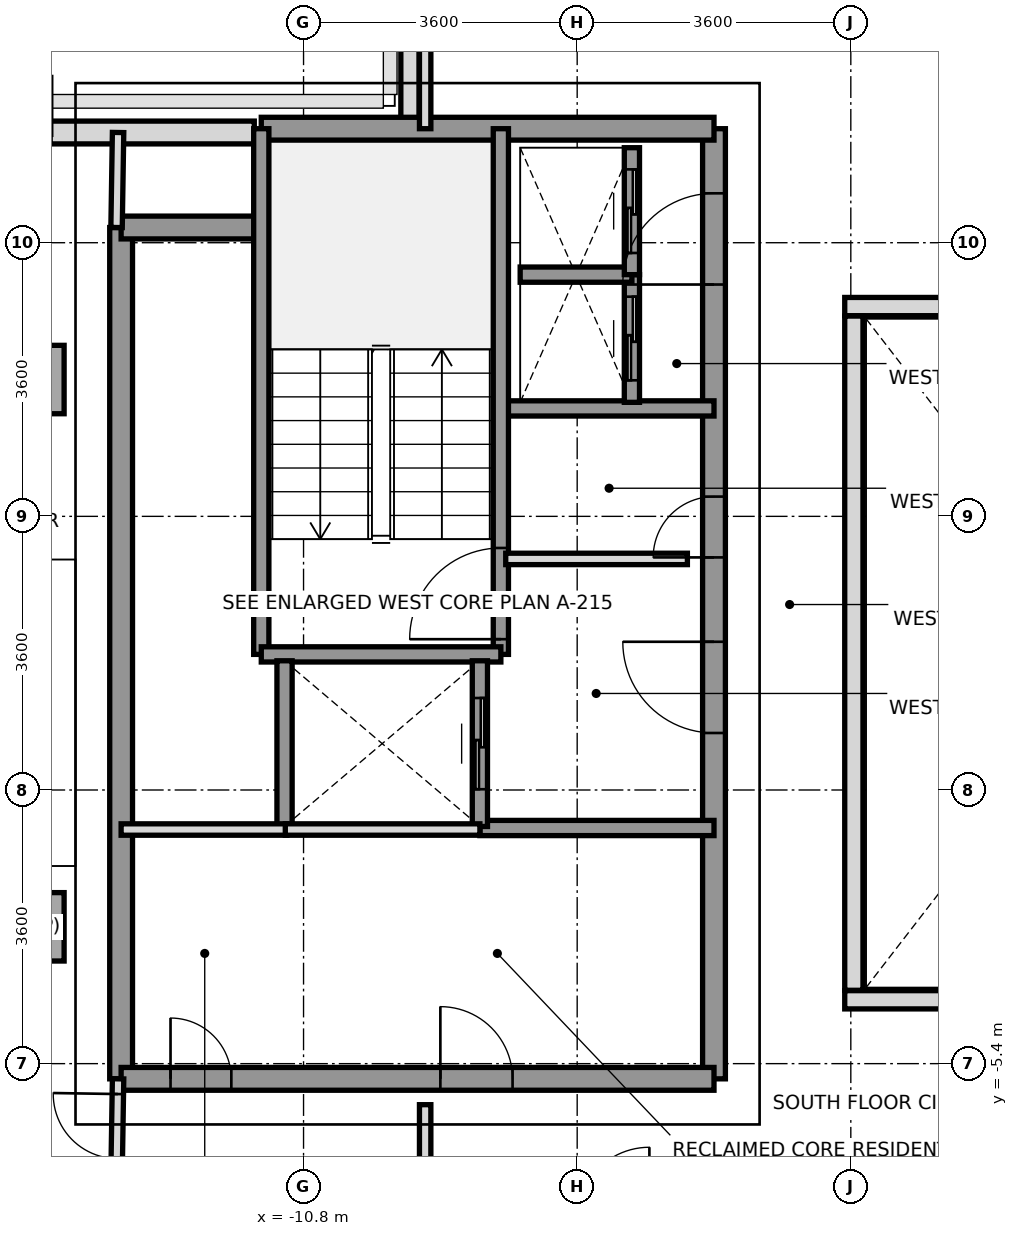
"""IFC4 building model, lengths in metres.
Left out: names, types, materials, properties, quantities, classifications, styles, units other than length and angle.
Written with IfcOpenShell. Run it as: python <this file> out.ifc"""

import sys

from ifc_helpers import new_model, si_unit, direction, frame, frame_2d, origin, origin_2d, place, context, subcontext, project, spatial, rectangle, extrude, source, transform, mapped, element, fill, save


model = new_model("IFC4")
c1 = context("Model", 3, precision=1e-05, world=origin(), true_north=direction((0.0, 1.0)))
c2 = subcontext(c1, "Body", "Model", "MODEL_VIEW")
j1 = project(units=[si_unit("LENGTHUNIT", "METRE"), si_unit("PLANEANGLEUNIT", "RADIAN")], contexts=[c1])
p1 = place(None, origin())
s1 = spatial("IfcSite", under=j1, at=p1, CompositionType="ELEMENT")
p2 = place(p1, origin())
s2 = spatial("IfcBuilding", under=s1, at=p2, CompositionType="ELEMENT")
p3 = place(p2, frame((0.0, 0.0, 242.8)))
s3 = spatial("IfcBuildingStorey", under=s2, at=p3, CompositionType="ELEMENT", Elevation=242.8)
m1 = source(origin(), c2, "Body", "SweptSolid", [
    extrude(rectangle(XDim=0.9, YDim=0.9, at=origin_2d()), origin(), (0.0, 0.0, 1.0), 3.01),
])
for number, where, z_axis, x_axis in (
    (1, (-14.4, -3.6, 0.0), (0.0, 0.0, 1.0), (1.0, 0.0, 0.0)),
    (2, (-14.4, 3.6, 0.0), (0.0, 0.0, 1.0), (1.0, 0.0, 0.0)),
):
    element("IfcColumn", number, at=place(p3, frame(where, z_axis=z_axis, x_axis=x_axis)), inside=s3, PredefinedType="COLUMN", context=c2, shape_type="MappedRepresentation", body=[
        mapped(m1, transform((0.0, 0.0, 0.0), x_axis=(1.0, 0.0, 0.0), y_axis=(0.0, 1.0, 0.0), z_axis=(0.0, 0.0, 1.0), scale=1.0)),
    ])
p4 = place(p3, frame((-14.133, 6.85, 0.0), z_axis=(0.0, 0.0, 1.0), x_axis=(1.0, 0.0, 0.0)))
e3 = element("IfcWall", 3, at=p4, inside=s3, PredefinedType="SOLIDWALL", context=c2, shape_type="SweptSolid", body=[
    extrude(rectangle(XDim=2.685, YDim=0.3, at=frame_2d((1.343, 0.0))), origin(), (0.0, 0.0, 1.0), 2.57),
])
p5 = place(p3, frame((-9.4, 6.953, 0.0), z_axis=(0.0, 0.0, 1.0), x_axis=(0.0, 1.0, 0.0)))
e4 = element("IfcWall", 4, at=p5, inside=s3, PredefinedType="PARAPET", context=c2, shape_type="SweptSolid", body=[
    extrude(rectangle(XDim=1.669, YDim=0.24, at=frame_2d((0.834, 0.0))), origin(), (0.0, 0.0, 1.0), 1.15),
])
p6 = place(p3, frame((-13.2, -5.6, 0.0), z_axis=(0.0, 0.0, 1.0), x_axis=(0.0, 1.0, 0.0)))
e5 = element("IfcWall", 5, at=p6, inside=s3, PredefinedType="SHEAR", context=c2, shape_type="SweptSolid", body=[
    extrude(rectangle(XDim=11.2, YDim=0.3, at=frame_2d((5.6, 0.0))), origin(), (0.0, 0.0, 1.0), 3.01),
])
p7 = place(p3, frame((-5.4, -5.6, 0.0), z_axis=(0.0, 0.0, 1.0), x_axis=(0.0, 1.0, 0.0)))
e6 = element("IfcWall", 6, at=p7, inside=s3, PredefinedType="SHEAR", context=c2, shape_type="SweptSolid", body=[
    extrude(rectangle(XDim=12.5, YDim=0.3, at=frame_2d((6.25, 0.0))), origin(), (0.0, 0.0, 1.0), 3.01),
])
p8 = place(p7, frame((4.55, 0.0, 0.0)))
e7 = element("IfcOpeningElement", 7, at=p8, cuts=e6, PredefinedType="OPENING", context=c2, shape_type="SweptSolid", body=[
    extrude(rectangle(XDim=1.2, YDim=2.2, at=frame_2d((0.6, 1.1))), frame((0.0, 0.16, 0.0), z_axis=(0.0, -1.0, 0.0), x_axis=(1.0, 0.0, 0.0)), (0.0, 0.0, 1.0), 0.32),
])
p9 = place(p7, frame((10.45, 0.0, 0.0)))
e8 = element("IfcOpeningElement", 8, at=p9, cuts=e6, PredefinedType="OPENING", context=c2, shape_type="SweptSolid", body=[
    extrude(rectangle(XDim=1.2, YDim=2.2, at=frame_2d((0.6, 1.1))), frame((0.0, 0.16, 0.0), z_axis=(0.0, -1.0, 0.0), x_axis=(1.0, 0.0, 0.0)), (0.0, 0.0, 1.0), 0.32),
])
p10 = place(p7, frame((6.86, 0.0, 0.0)))
e9 = element("IfcOpeningElement", 9, at=p10, cuts=e6, PredefinedType="OPENING", context=c2, shape_type="SweptSolid", body=[
    extrude(rectangle(XDim=0.8, YDim=2.1, at=frame_2d((0.4, 1.05))), frame((0.0, 0.16, 0.0), z_axis=(0.0, -1.0, 0.0), x_axis=(1.0, 0.0, 0.0)), (0.0, 0.0, 1.0), 0.32),
])
p11 = place(p3, frame((-11.356, 6.9, 0.0), z_axis=(0.0, 0.0, 1.0), x_axis=(1.0, 0.0, 0.0)))
e10 = element("IfcWall", 10, at=p11, inside=s3, PredefinedType="SHEAR", context=c2, shape_type="SweptSolid", body=[
    extrude(rectangle(XDim=5.956, YDim=0.3, at=frame_2d((2.978, 0.0))), origin(), (0.0, 0.0, 1.0), 3.01),
])
p12 = place(p3, frame((-13.2, 5.6, 0.0), z_axis=(0.0, 0.0, 1.0), x_axis=(1.0, 0.0, 0.0)))
e11 = element("IfcWall", 11, at=p12, inside=s3, PredefinedType="SHEAR", context=c2, shape_type="SweptSolid", body=[
    extrude(rectangle(XDim=1.844, YDim=0.3, at=frame_2d((0.922, 0.0))), origin(), (0.0, 0.0, 1.0), 3.01),
])
p13 = place(p3, frame((-13.2, -5.6, 0.0), z_axis=(0.0, 0.0, 1.0), x_axis=(1.0, 0.0, 0.0)))
e12 = element("IfcWall", 12, at=p13, inside=s3, PredefinedType="SHEAR", context=c2, shape_type="SweptSolid", body=[
    extrude(rectangle(XDim=7.8, YDim=0.3, at=frame_2d((3.9, 0.0))), origin(), (0.0, 0.0, 1.0), 3.01),
])
p14 = place(p13, frame((0.65, 0.0, 0.0)))
e13 = element("IfcOpeningElement", 13, at=p14, cuts=e12, PredefinedType="OPENING", context=c2, shape_type="SweptSolid", body=[
    extrude(rectangle(XDim=0.8, YDim=2.1, at=frame_2d((0.4, 1.05))), frame((0.0, 0.16, 0.0), z_axis=(0.0, -1.0, 0.0), x_axis=(1.0, 0.0, 0.0)), (0.0, 0.0, 1.0), 0.32),
])
p15 = place(p13, frame((4.2, 0.0, 0.0)))
e14 = element("IfcOpeningElement", 14, at=p15, cuts=e12, PredefinedType="OPENING", context=c2, shape_type="SweptSolid", body=[
    extrude(rectangle(XDim=0.95, YDim=2.15, at=frame_2d((0.475, 1.075))), frame((0.0, 0.16, 0.0), z_axis=(0.0, -1.0, 0.0), x_axis=(1.0, 0.0, 0.0)), (0.0, 0.0, 1.0), 0.32),
])
p16 = place(p3, frame((-8.18, 3.22, 0.0), z_axis=(0.0, 0.0, 1.0), x_axis=(1.0, 0.0, 0.0)))
e15 = element("IfcWall", 15, at=p16, inside=s3, PredefinedType="SOLIDWALL", context=c2, shape_type="SweptSolid", body=[
    extrude(rectangle(XDim=2.78, YDim=0.2, at=frame_2d((1.39, 0.0))), origin(), (0.0, 0.0, 1.0), 3.01),
])
p17 = place(p3, frame((-8.48, -2.3, 0.0), z_axis=(0.0, 0.0, 1.0), x_axis=(1.0, 0.0, 0.0)))
e16 = element("IfcWall", 16, at=p17, inside=s3, PredefinedType="SOLIDWALL", context=c2, shape_type="SweptSolid", body=[
    extrude(rectangle(XDim=3.08, YDim=0.2, at=frame_2d((1.54, 0.0))), origin(), (0.0, 0.0, 1.0), 3.01),
])
p18 = place(p3, frame((-8.204, -0.016, 0.0), z_axis=(0.0, 0.0, 1.0), x_axis=(0.0, 1.0, 0.0)))
e17 = element("IfcWall", 17, at=p18, inside=s3, PredefinedType="SOLIDWALL", context=c2, shape_type="SweptSolid", body=[
    extrude(rectangle(XDim=6.916, YDim=0.2, at=frame_2d((3.458, 0.0))), origin(), (0.0, 0.0, 1.0), 3.01),
])
p19 = place(p18, frame((0.2, 0.0, 0.0)))
e18 = element("IfcOpeningElement", 18, at=p19, cuts=e17, PredefinedType="OPENING", context=c2, shape_type="SweptSolid", body=[
    extrude(rectangle(XDim=1.2, YDim=2.2, at=frame_2d((0.6, 1.1))), frame((0.0, 0.11, 0.0), z_axis=(0.0, -1.0, 0.0), x_axis=(1.0, 0.0, 0.0)), (0.0, 0.0, 1.0), 0.22),
])
p20 = place(p3, frame((-11.356, -0.016, 0.0), z_axis=(0.0, 0.0, 1.0), x_axis=(0.0, 1.0, 0.0)))
e19 = element("IfcWall", 19, at=p20, inside=s3, PredefinedType="SOLIDWALL", context=c2, shape_type="SweptSolid", body=[
    extrude(rectangle(XDim=6.916, YDim=0.2, at=frame_2d((3.458, 0.0))), origin(), (0.0, 0.0, 1.0), 3.01),
])
p21 = place(p3, frame((-11.356, -0.016, 0.0), z_axis=(0.0, 0.0, 1.0), x_axis=(1.0, 0.0, 0.0)))
e20 = element("IfcWall", 20, at=p21, inside=s3, PredefinedType="SOLIDWALL", context=c2, shape_type="SweptSolid", body=[
    extrude(rectangle(XDim=3.152, YDim=0.2, at=frame_2d((1.576, 0.0))), origin(), (0.0, 0.0, 1.0), 3.01),
])
p22 = place(p3, frame((-11.05, -2.28, 0.0), z_axis=(0.0, 0.0, 1.0), x_axis=(0.0, 1.0, 0.0)))
e21 = element("IfcWall", 21, at=p22, inside=s3, PredefinedType="SOLIDWALL", context=c2, shape_type="SweptSolid", body=[
    extrude(rectangle(XDim=2.18, YDim=0.2, at=frame_2d((1.09, 0.0))), origin(), (0.0, 0.0, 1.0), 3.01),
])
p23 = place(p3, frame((-8.48, -2.28, 0.0), z_axis=(0.0, 0.0, 1.0), x_axis=(0.0, 1.0, 0.0)))
e22 = element("IfcWall", 22, at=p23, inside=s3, PredefinedType="SOLIDWALL", context=c2, shape_type="SweptSolid", body=[
    extrude(rectangle(XDim=2.18, YDim=0.2, at=frame_2d((1.09, 0.0))), origin(), (0.0, 0.0, 1.0), 3.01),
])
p24 = place(p23, frame((0.49, 0.0, 0.0)))
e23 = element("IfcOpeningElement", 23, at=p24, cuts=e22, PredefinedType="OPENING", context=c2, shape_type="SweptSolid", body=[
    extrude(rectangle(XDim=1.2, YDim=2.2, at=frame_2d((0.6, 1.1))), frame((0.0, 0.11, 0.0), z_axis=(0.0, -1.0, 0.0), x_axis=(1.0, 0.0, 0.0)), (0.0, 0.0, 1.0), 0.22),
])
p25 = place(p3, frame((-6.48, 3.3, 0.0), z_axis=(0.0, 0.0, 1.0), x_axis=(0.0, 1.0, 0.0)))
e24 = element("IfcWall", 24, at=p25, inside=s3, PredefinedType="SOLIDWALL", context=c2, shape_type="SweptSolid", body=[
    extrude(rectangle(XDim=1.68, YDim=0.2, at=frame_2d((0.84, 0.0))), origin(), (0.0, 0.0, 1.0), 3.01),
])
p26 = place(p25, frame((0.29, 0.0, 0.0)))
e25 = element("IfcOpeningElement", 25, at=p26, cuts=e24, PredefinedType="OPENING", context=c2, shape_type="SweptSolid", body=[
    extrude(rectangle(XDim=1.1, YDim=2.2, at=frame_2d((0.55, 1.1))), frame((0.0, 0.11, 0.0), z_axis=(0.0, -1.0, 0.0), x_axis=(1.0, 0.0, 0.0)), (0.0, 0.0, 1.0), 0.22),
])
p27 = place(p3, frame((-7.95, 4.98, 0.0), z_axis=(0.0, 0.0, 1.0), x_axis=(1.0, 0.0, 0.0)))
e26 = element("IfcWall", 26, at=p27, inside=s3, PredefinedType="SOLIDWALL", context=c2, shape_type="SweptSolid", body=[
    extrude(rectangle(XDim=1.47, YDim=0.2, at=frame_2d((0.735, 0.0))), origin(), (0.0, 0.0, 1.0), 3.01),
])
p28 = place(p3, frame((-6.48, 4.98, 0.0), z_axis=(0.0, 0.0, 1.0), x_axis=(0.0, 1.0, 0.0)))
e27 = element("IfcWall", 27, at=p28, inside=s3, PredefinedType="SOLIDWALL", context=c2, shape_type="SweptSolid", body=[
    extrude(rectangle(XDim=1.67, YDim=0.2, at=frame_2d((0.835, 0.0))), origin(), (0.0, 0.0, 1.0), 3.01),
])
p29 = place(p28, frame((0.285, 0.0, 0.0)))
e28 = element("IfcOpeningElement", 28, at=p29, cuts=e27, PredefinedType="OPENING", context=c2, shape_type="SweptSolid", body=[
    extrude(rectangle(XDim=1.1, YDim=2.2, at=frame_2d((0.55, 1.1))), frame((0.0, 0.11, 0.0), z_axis=(0.0, -1.0, 0.0), x_axis=(1.0, 0.0, 0.0)), (0.0, 0.0, 1.0), 0.22),
])
p30 = place(p3, frame((-8.14, 1.24, 0.0), z_axis=(0.0, 0.0, 1.0), x_axis=(1.0, 0.0, 0.0)))
e29 = element("IfcWall", 29, at=p30, inside=s3, PredefinedType="PARTITIONING", context=c2, shape_type="SweptSolid", body=[
    extrude(rectangle(XDim=2.39, YDim=0.15, at=frame_2d((1.195, 0.0))), origin(), (0.0, 0.0, 1.0), 3.01),
])
p31 = place(p3, frame((-13.2, -2.32, 0.0), z_axis=(0.0, 0.0, 1.0), x_axis=(1.0, 0.0, 0.0)))
e30 = element("IfcWall", 30, at=p31, inside=s3, PredefinedType="PARTITIONING", context=c2, shape_type="SweptSolid", body=[
    extrude(rectangle(XDim=2.18, YDim=0.15, at=frame_2d((1.09, 0.0))), origin(), (0.0, 0.0, 1.0), 3.01),
])
p32 = place(p3, frame((-11.04, -2.32, 0.0), z_axis=(0.0, 0.0, 1.0), x_axis=(1.0, 0.0, 0.0)))
e31 = element("IfcWall", 31, at=p32, inside=s3, PredefinedType="PARTITIONING", context=c2, shape_type="SweptSolid", body=[
    extrude(rectangle(XDim=2.56, YDim=0.15, at=frame_2d((1.28, 0.0))), origin(), (0.0, 0.0, 1.0), 3.01),
])
p33 = place(p3, frame((-9.2, 6.9, 0.0), z_axis=(0.0, 0.0, 1.0), x_axis=(0.0, 1.0, 0.0)))
e32 = element("IfcWall", 32, at=p33, inside=s3, PredefinedType="PARTITIONING", context=c2, shape_type="SweptSolid", body=[
    extrude(rectangle(XDim=3.38, YDim=0.15, at=frame_2d((1.69, 0.0))), origin(), (0.0, 0.0, 1.0), 2.61),
])
p34 = place(p3, frame((-9.2, -10.28, 0.0), z_axis=(0.0, 0.0, 1.0), x_axis=(0.0, 1.0, 0.0)))
e33 = element("IfcWall", 33, at=p34, inside=s3, PredefinedType="PARTITIONING", context=c2, shape_type="SweptSolid", body=[
    extrude(rectangle(XDim=4.34, YDim=0.15, at=frame_2d((2.17, 0.0))), origin(), (0.0, 0.0, 1.0), 2.61),
])
p35 = place(p3, frame((-13.26, 5.6, 0.0), z_axis=(0.0, 0.0, 1.0), x_axis=(0.016013571389, 0.999871774545, 0.0)))
e34 = element("IfcWall", 34, at=p35, inside=s3, PredefinedType="PARTITIONING", context=c2, shape_type="SweptSolid", body=[
    extrude(rectangle(XDim=1.25, YDim=0.15, at=frame_2d((0.625, 0.0))), origin(), (0.0, 0.0, 1.0), 3.01),
])
p36 = place(p3, frame((-13.26, -6.85, 0.0), z_axis=(0.0, 0.0, 1.0), x_axis=(0.016013571389, 0.999871774545, 0.0)))
e35 = element("IfcWall", 35, at=p36, inside=s3, PredefinedType="PARTITIONING", context=c2, shape_type="SweptSolid", body=[
    extrude(rectangle(XDim=1.25, YDim=0.15, at=frame_2d((0.625, 0.0))), origin(), (0.0, 0.0, 1.0), 3.01),
])
p37 = place(p36, frame((0.2, 0.0, 0.0)))
e36 = element("IfcOpeningElement", 36, at=p37, cuts=e35, PredefinedType="OPENING", context=c2, shape_type="SweptSolid", body=[
    extrude(rectangle(XDim=0.85, YDim=2.1, at=frame_2d((0.425, 1.05))), frame((0.0, 0.085, 0.0), z_axis=(0.0, -1.0, 0.0), x_axis=(1.0, 0.0, 0.0)), (0.0, 0.0, 1.0), 0.17),
])
for number, where, z_axis, x_axis in (
    (37, (-3.68, -4.56, 0.0), (0.0, 0.0, 1.0), (1.0, 0.0, 0.0)),
    (38, (-3.68, 4.56, 0.0), (0.0, 0.0, 1.0), (1.0, 0.0, 0.0)),
):
    element("IfcWall", number, at=place(p3, frame(where, z_axis=z_axis, x_axis=x_axis)), inside=s3, PredefinedType="PARAPET", context=c2, shape_type="SweptSolid", body=[
        extrude(rectangle(XDim=7.36, YDim=0.24, at=frame_2d((3.68, 0.0))), origin(), (0.0, 0.0, 1.0), 1.15),
    ])
p38 = place(p3, frame((-3.56, -4.435, 0.0), z_axis=(0.0, 0.0, 1.0), x_axis=(0.0, 1.0, 0.0)))
e39 = element("IfcWall", 39, at=p38, inside=s3, PredefinedType="PARAPET", context=c2, shape_type="SweptSolid", body=[
    extrude(rectangle(XDim=8.87, YDim=0.24, at=frame_2d((4.435, 0.0))), origin(), (0.0, 0.0, 1.0), 1.15),
])
m2 = source(origin(), c2, "Body", "SweptSolid", [
    extrude(rectangle(XDim=1.2, YDim=2.2, at=frame_2d((0.6, 1.1))), frame((0.0, 0.025, 0.0), z_axis=(0.0, -1.0, 0.0), x_axis=(1.0, 0.0, 0.0)), (0.0, 0.0, 1.0), 0.05),
])
p39 = place(p19, origin())
e40 = element("IfcDoor", 40, at=p39, inside=s3, OperationType="SINGLE_SWING_LEFT", PredefinedType="DOOR", context=c2, shape_type="MappedRepresentation", body=[
    mapped(m2, transform((0.0, 0.0, 0.0), x_axis=(1.0, 0.0, 0.0), y_axis=(0.0, 1.0, 0.0), z_axis=(0.0, 0.0, 1.0), scale=1.0)),
])
fill(e18, e40)
p40 = place(p8, origin())
e41 = element("IfcDoor", 41, at=p40, inside=s3, OperationType="SINGLE_SWING_RIGHT", PredefinedType="DOOR", context=c2, shape_type="MappedRepresentation", body=[
    mapped(m2, transform((0.0, 0.0, 0.0), x_axis=(1.0, 0.0, 0.0), y_axis=(0.0, 1.0, 0.0), z_axis=(0.0, 0.0, 1.0), scale=1.0)),
])
fill(e7, e41)
p41 = place(p9, origin())
e42 = element("IfcDoor", 42, at=p41, inside=s3, OperationType="SINGLE_SWING_LEFT", PredefinedType="DOOR", context=c2, shape_type="MappedRepresentation", body=[
    mapped(m2, transform((0.0, 0.0, 0.0), x_axis=(1.0, 0.0, 0.0), y_axis=(0.0, 1.0, 0.0), z_axis=(0.0, 0.0, 1.0), scale=1.0)),
])
fill(e8, e42)
m3 = source(origin(), c2, "Body", "SweptSolid", [
    extrude(rectangle(XDim=0.8, YDim=2.1, at=frame_2d((0.4, 1.05))), frame((0.0, 0.025, 0.0), z_axis=(0.0, -1.0, 0.0), x_axis=(1.0, 0.0, 0.0)), (0.0, 0.0, 1.0), 0.05),
])
p42 = place(p10, origin())
e43 = element("IfcDoor", 43, at=p42, inside=s3, OperationType="SINGLE_SWING_LEFT", PredefinedType="DOOR", context=c2, shape_type="MappedRepresentation", body=[
    mapped(m3, transform((0.0, 0.0, 0.0), x_axis=(1.0, 0.0, 0.0), y_axis=(0.0, 1.0, 0.0), z_axis=(0.0, 0.0, 1.0), scale=1.0)),
])
fill(e9, e43)
p43 = place(p14, origin())
e44 = element("IfcDoor", 44, at=p43, inside=s3, OperationType="SINGLE_SWING_LEFT", PredefinedType="DOOR", context=c2, shape_type="MappedRepresentation", body=[
    mapped(m3, transform((0.0, 0.0, 0.0), x_axis=(1.0, 0.0, 0.0), y_axis=(0.0, 1.0, 0.0), z_axis=(0.0, 0.0, 1.0), scale=1.0)),
])
fill(e13, e44)
m4 = source(origin(), c2, "Body", "SweptSolid", [
    extrude(rectangle(XDim=0.95, YDim=2.15, at=frame_2d((0.475, 1.075))), frame((0.0, 0.025, 0.0), z_axis=(0.0, -1.0, 0.0), x_axis=(1.0, 0.0, 0.0)), (0.0, 0.0, 1.0), 0.05),
])
p44 = place(p15, origin())
e45 = element("IfcDoor", 45, at=p44, inside=s3, OperationType="SINGLE_SWING_LEFT", PredefinedType="DOOR", context=c2, shape_type="MappedRepresentation", body=[
    mapped(m4, transform((0.0, 0.0, 0.0), x_axis=(1.0, 0.0, 0.0), y_axis=(0.0, 1.0, 0.0), z_axis=(0.0, 0.0, 1.0), scale=1.0)),
])
fill(e14, e45)
p45 = place(p24, origin())
e46 = element("IfcDoor", 46, at=p45, inside=s3, OperationType="SLIDING_TO_RIGHT", PredefinedType="DOOR", context=c2, shape_type="MappedRepresentation", body=[
    mapped(m2, transform((0.0, 0.0, 0.0), x_axis=(1.0, 0.0, 0.0), y_axis=(0.0, 1.0, 0.0), z_axis=(0.0, 0.0, 1.0), scale=1.0)),
])
fill(e23, e46)
m5 = source(origin(), c2, "Body", "SweptSolid", [
    extrude(rectangle(XDim=1.1, YDim=2.2, at=frame_2d((0.55, 1.1))), frame((0.0, 0.025, 0.0), z_axis=(0.0, -1.0, 0.0), x_axis=(1.0, 0.0, 0.0)), (0.0, 0.0, 1.0), 0.05),
])
p46 = place(p26, origin())
e47 = element("IfcDoor", 47, at=p46, inside=s3, OperationType="SLIDING_TO_LEFT", PredefinedType="DOOR", context=c2, shape_type="MappedRepresentation", body=[
    mapped(m5, transform((0.0, 0.0, 0.0), x_axis=(1.0, 0.0, 0.0), y_axis=(0.0, 1.0, 0.0), z_axis=(0.0, 0.0, 1.0), scale=1.0)),
])
fill(e25, e47)
p47 = place(p29, origin())
e48 = element("IfcDoor", 48, at=p47, inside=s3, OperationType="SLIDING_TO_LEFT", PredefinedType="DOOR", context=c2, shape_type="MappedRepresentation", body=[
    mapped(m5, transform((0.0, 0.0, 0.0), x_axis=(1.0, 0.0, 0.0), y_axis=(0.0, 1.0, 0.0), z_axis=(0.0, 0.0, 1.0), scale=1.0)),
])
fill(e28, e48)
m6 = source(origin(), c2, "Body", "SweptSolid", [
    extrude(rectangle(XDim=0.85, YDim=2.1, at=frame_2d((0.425, 1.05))), frame((0.0, 0.025, 0.0), z_axis=(0.0, -1.0, 0.0), x_axis=(1.0, 0.0, 0.0)), (0.0, 0.0, 1.0), 0.05),
])
p48 = place(p37, origin())
e49 = element("IfcDoor", 49, at=p48, inside=s3, OperationType="SINGLE_SWING_RIGHT", PredefinedType="DOOR", context=c2, shape_type="MappedRepresentation", body=[
    mapped(m6, transform((0.0, 0.0, 0.0), x_axis=(1.0, 0.0, 0.0), y_axis=(0.0, 1.0, 0.0), z_axis=(0.0, 0.0, 1.0), scale=1.0)),
])
fill(e36, e49)
save(model, sys.argv[1])
